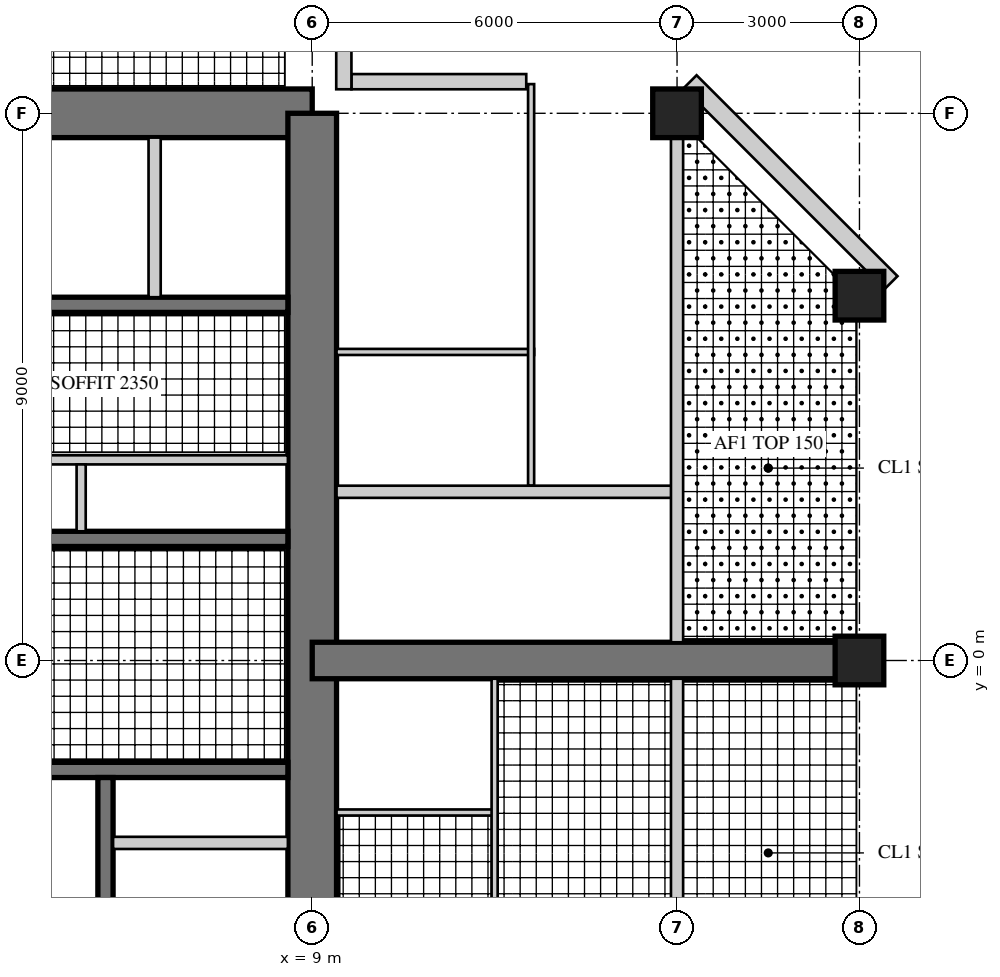
"""IFC4 building model, lengths in metres.
Left out: names, types, materials, properties, quantities, classifications, styles, units other than length and angle.
Written with IfcOpenShell. Run it as: python <this file> out.ifc"""

import sys

from ifc_helpers import new_model, si_unit, direction, frame, frame_2d, origin, origin_2d, place, context, subcontext, project, spatial, rectangle, hollow_rectangle, extrude, element, fill, save


model = new_model("IFC4")
c1 = context("Model", 3, precision=1e-05, world=origin(), true_north=direction((0.0, 1.0)))
c2 = subcontext(c1, "Body", "Model", "MODEL_VIEW")
j1 = project(units=[si_unit("LENGTHUNIT", "METRE"), si_unit("PLANEANGLEUNIT", "RADIAN")], contexts=[c1])
p1 = place(None, origin())
s1 = spatial("IfcSite", under=j1, at=p1, CompositionType="ELEMENT")
p2 = place(p1, origin())
s2 = spatial("IfcBuilding", under=s1, at=p2, CompositionType="ELEMENT")
p3 = place(p2, frame((0.0, 0.0, 235.7)))
s3 = spatial("IfcBuildingStorey", under=s2, at=p3, CompositionType="ELEMENT", Elevation=235.7)
p4 = place(p3, frame((9.0, 9.0, 0.0), z_axis=(0.0, 0.0, 1.0), x_axis=(-1.0, 0.0, 0.0)))
e1 = element("IfcWall", 1, at=p4, inside=s3, PredefinedType="SHEAR", context=c2, shape_type="SweptSolid", body=[
    extrude(rectangle(XDim=18.0, YDim=0.8, at=frame_2d((9.0, 0.0))), origin(), (0.0, 0.0, 1.0), 3.4),
])
p5 = place(p4, frame((9.8, 0.0, 0.0)))
e2 = element("IfcOpeningElement", 2, at=p5, cuts=e1, PredefinedType="OPENING", context=c2, shape_type="SweptSolid", body=[
    extrude(rectangle(XDim=1.0, YDim=2.4, at=frame_2d((0.5, 1.2))), frame((0.0, 0.41, 0.0), z_axis=(0.0, -1.0, 0.0), x_axis=(1.0, 0.0, 0.0)), (0.0, 0.0, 1.0), 0.82),
])
p6 = place(p3, frame((9.0, -9.0, 0.0), z_axis=(0.0, 0.0, 1.0), x_axis=(0.0, 1.0, 0.0)))
e3 = element("IfcWall", 3, at=p6, inside=s3, PredefinedType="SHEAR", context=c2, shape_type="SweptSolid", body=[
    extrude(rectangle(XDim=18.0, YDim=0.8, at=frame_2d((9.0, 0.0))), origin(), (0.0, 0.0, 1.0), 3.4),
])
p7 = place(p6, frame((9.8, 0.0, 0.0)))
e4 = element("IfcOpeningElement", 4, at=p7, cuts=e3, PredefinedType="OPENING", context=c2, shape_type="SweptSolid", body=[
    extrude(rectangle(XDim=1.0, YDim=2.4, at=frame_2d((0.5, 1.2))), frame((0.0, 0.41, 0.0), z_axis=(0.0, -1.0, 0.0), x_axis=(1.0, 0.0, 0.0)), (0.0, 0.0, 1.0), 0.82),
])
p8 = place(p3, frame((1.925, 2.0, 0.0), z_axis=(0.0, 0.0, 1.0), x_axis=(1.0, 0.0, 0.0)))
e5 = element("IfcWall", 5, at=p8, inside=s3, PredefinedType="SHEAR", context=c2, shape_type="SweptSolid", body=[
    extrude(rectangle(XDim=6.675, YDim=0.25, at=frame_2d((3.337, 0.0))), origin(), (0.0, 0.0, 1.0), 3.4),
])
p9 = place(p3, frame((1.925, 5.85, 0.0), z_axis=(0.0, 0.0, 1.0), x_axis=(1.0, 0.0, 0.0)))
e6 = element("IfcWall", 6, at=p9, inside=s3, PredefinedType="SHEAR", context=c2, shape_type="SweptSolid", body=[
    extrude(rectangle(XDim=6.675, YDim=0.25, at=frame_2d((3.337, 0.0))), origin(), (0.0, 0.0, 1.0), 3.4),
])
p10 = place(p9, frame((0.546, 0.0, 0.0)))
e7 = element("IfcOpeningElement", 7, at=p10, cuts=e6, PredefinedType="OPENING", context=c2, shape_type="SweptSolid", body=[
    extrude(rectangle(XDim=1.0, YDim=2.1, at=frame_2d((0.5, 1.05))), frame((0.0, 0.135, 0.0), z_axis=(0.0, -1.0, 0.0), x_axis=(1.0, 0.0, 0.0)), (0.0, 0.0, 1.0), 0.27),
])
p11 = place(p9, frame((5.129, 0.0, 0.0)))
e8 = element("IfcOpeningElement", 8, at=p11, cuts=e6, PredefinedType="OPENING", context=c2, shape_type="SweptSolid", body=[
    extrude(rectangle(XDim=1.0, YDim=2.1, at=frame_2d((0.5, 1.05))), frame((0.0, 0.135, 0.0), z_axis=(0.0, -1.0, 0.0), x_axis=(1.0, 0.0, 0.0)), (0.0, 0.0, 1.0), 0.27),
])
p12 = place(p3, frame((1.925, 3.3, 0.0), z_axis=(0.0, 0.0, 1.0), x_axis=(1.0, 0.0, 0.0)))
e9 = element("IfcWall", 9, at=p12, inside=s3, PredefinedType="PARTITIONING", context=c2, shape_type="SweptSolid", body=[
    extrude(rectangle(XDim=6.675, YDim=0.15, at=frame_2d((3.337, 0.0))), origin(), (0.0, 0.0, 1.0), 3.4),
])
p13 = place(p12, frame((0.075, 0.0, 0.0)))
e10 = element("IfcOpeningElement", 10, at=p13, cuts=e9, PredefinedType="OPENING", context=c2, shape_type="SweptSolid", body=[
    extrude(rectangle(XDim=0.8, YDim=2.1, at=frame_2d((0.4, 1.05))), frame((0.0, 0.085, 0.0), z_axis=(0.0, -1.0, 0.0), x_axis=(1.0, 0.0, 0.0)), (0.0, 0.0, 1.0), 0.17),
])
p14 = place(p12, frame((3.675, 0.0, 0.0)))
e11 = element("IfcOpeningElement", 11, at=p14, cuts=e9, PredefinedType="OPENING", context=c2, shape_type="SweptSolid", body=[
    extrude(rectangle(XDim=0.8, YDim=2.1, at=frame_2d((0.4, 1.05))), frame((0.0, 0.085, 0.0), z_axis=(0.0, -1.0, 0.0), x_axis=(1.0, 0.0, 0.0)), (0.0, 0.0, 1.0), 0.17),
])
p15 = place(p3, frame((5.2, 2.125, 0.0), z_axis=(0.0, 0.0, 1.0), x_axis=(0.0, 1.0, 0.0)))
e12 = element("IfcWall", 12, at=p15, inside=s3, PredefinedType="PARTITIONING", context=c2, shape_type="SweptSolid", body=[
    extrude(rectangle(XDim=1.1, YDim=0.15, at=frame_2d((0.55, 0.0))), origin(), (0.0, 0.0, 1.0), 3.4),
])
p16 = place(p3, frame((6.408, 5.975, 0.0), z_axis=(0.0, 0.0, 1.0), x_axis=(0.0, 1.0, 0.0)))
e13 = element("IfcWall", 13, at=p16, inside=s3, PredefinedType="PARTITIONING", context=c2, shape_type="SweptSolid", body=[
    extrude(rectangle(XDim=2.625, YDim=0.2, at=frame_2d((1.312, 0.0))), origin(), (0.0, 0.0, 1.0), 3.4),
])
p17 = place(p3, frame((2.125, -1.8, 0.0), z_axis=(0.0, 0.0, 1.0), x_axis=(1.0, 0.0, 0.0)))
e14 = element("IfcWall", 14, at=p17, inside=s3, PredefinedType="SHEAR", context=c2, shape_type="SweptSolid", body=[
    extrude(rectangle(XDim=6.475, YDim=0.25, at=frame_2d((3.238, 0.0))), origin(), (0.0, 0.0, 1.0), 3.4),
])
p18 = place(p3, frame((5.6, -1.925, 0.0), z_axis=(0.0, 0.0, 1.0), x_axis=(0.0, -1.0, 0.0)))
e15 = element("IfcWall", 15, at=p18, inside=s3, PredefinedType="SHEAR", context=c2, shape_type="SweptSolid", body=[
    extrude(rectangle(XDim=3.55, YDim=0.25, at=frame_2d((1.775, 0.0))), origin(), (0.0, 0.0, 1.0), 3.4),
])
p19 = place(p18, frame((1.525, 0.0, 0.0)))
e16 = element("IfcOpeningElement", 16, at=p19, cuts=e15, PredefinedType="OPENING", context=c2, shape_type="SweptSolid", body=[
    extrude(rectangle(XDim=1.1, YDim=2.2, at=frame_2d((0.55, 1.1))), frame((0.0, 0.135, 0.0), z_axis=(0.0, -1.0, 0.0), x_axis=(1.0, 0.0, 0.0)), (0.0, 0.0, 1.0), 0.27),
])
p20 = place(p18, frame((0.075, 0.0, 0.0)))
e17 = element("IfcOpeningElement", 17, at=p20, cuts=e15, PredefinedType="OPENING", context=c2, shape_type="SweptSolid", body=[
    extrude(rectangle(XDim=0.8, YDim=2.1, at=frame_2d((0.4, 1.05))), frame((0.0, 0.135, 0.0), z_axis=(0.0, -1.0, 0.0), x_axis=(1.0, 0.0, 0.0)), (0.0, 0.0, 1.0), 0.27),
])
p21 = place(p3, frame((5.725, -3.0, 0.0), z_axis=(0.0, 0.0, 1.0), x_axis=(1.0, 0.0, 0.0)))
e18 = element("IfcWall", 18, at=p21, inside=s3, PredefinedType="PARTITIONING", context=c2, shape_type="SweptSolid", body=[
    extrude(rectangle(XDim=2.875, YDim=0.2, at=frame_2d((1.438, 0.0))), origin(), (0.0, 0.0, 1.0), 3.4),
])
p22 = place(p3, frame((9.0, 0.0, 0.0), z_axis=(0.0, 0.0, 1.0), x_axis=(1.0, 0.0, 0.0)))
e19 = element("IfcWall", 19, at=p22, inside=s3, PredefinedType="SHEAR", context=c2, shape_type="SweptSolid", body=[
    extrude(rectangle(XDim=9.0, YDim=0.6, at=frame_2d((4.5, 0.0))), origin(), (0.0, 0.0, 1.0), 3.4),
])
p23 = place(p22, frame((3.8, 0.0, 0.0)))
e20 = element("IfcOpeningElement", 20, at=p23, cuts=e19, PredefinedType="OPENING", context=c2, shape_type="SweptSolid", body=[
    extrude(rectangle(XDim=1.0, YDim=2.15, at=frame_2d((0.5, 1.075))), frame((0.0, 0.31, 0.0), z_axis=(0.0, -1.0, 0.0), x_axis=(1.0, 0.0, 0.0)), (0.0, 0.0, 1.0), 0.62),
])
p24 = place(p22, frame((7.0, 0.0, 0.0)))
e21 = element("IfcOpeningElement", 21, at=p24, cuts=e19, PredefinedType="OPENING", context=c2, shape_type="SweptSolid", body=[
    extrude(rectangle(XDim=1.0, YDim=2.2, at=frame_2d((0.5, 1.1))), frame((0.0, 0.31, 0.0), z_axis=(0.0, -1.0, 0.0), x_axis=(1.0, 0.0, 0.0)), (0.0, 0.0, 1.0), 0.62),
])
for number, where, z_axis, x_axis in (
    (22, (15.0, 9.0, 0.0), (0.0, 0.0, 1.0), (1.0, 0.0, 0.0)),
    (23, (18.0, 0.0, 0.0), (0.0, 0.0, 1.0), (1.0, 0.0, 0.0)),
    (24, (18.0, 6.0, 0.0), (0.0, 0.0, 1.0), (1.0, 0.0, 0.0)),
):
    element("IfcColumn", number, at=place(p3, frame(where, z_axis=z_axis, x_axis=x_axis)), inside=s3, PredefinedType="COLUMN", context=c2, shape_type="SweptSolid", body=[
        extrude(rectangle(XDim=0.8, YDim=0.8, at=origin_2d()), origin(), (0.0, 0.0, 1.0), 3.4),
    ])
p25 = place(p3, frame((18.52, 6.215, 0.0), z_axis=(0.0, 0.0, 1.0), x_axis=(-0.707106781187, 0.707106781187, 0.0)))
e25 = element("IfcWall", 25, at=p25, inside=s3, PredefinedType="SOLIDWALL", context=c2, shape_type="SweptSolid", body=[
    extrude(rectangle(XDim=4.674, YDim=0.3, at=frame_2d((2.337, 0.0))), origin(), (0.0, 0.0, 1.0), 3.22),
])
p26 = place(p25, frame((1.887, 0.0, 0.3)))
e26 = element("IfcOpeningElement", 26, at=p26, cuts=e25, PredefinedType="OPENING", context=c2, shape_type="SweptSolid", body=[
    extrude(rectangle(XDim=0.9, YDim=2.4, at=frame_2d((0.45, 1.2))), frame((0.0, 0.16, 0.0), z_axis=(0.0, -1.0, 0.0), x_axis=(1.0, 0.0, 0.0)), (0.0, 0.0, 1.0), 0.32),
])
p27 = place(p3, frame((12.52, 9.52, 0.0), z_axis=(0.0, 0.0, 1.0), x_axis=(-1.0, 0.0, 0.0)))
e27 = element("IfcWall", 27, at=p27, inside=s3, PredefinedType="SOLIDWALL", context=c2, shape_type="SweptSolid", body=[
    extrude(rectangle(XDim=2.875, YDim=0.25, at=frame_2d((1.438, 0.0))), origin(), (0.0, 0.0, 1.0), 3.22),
])
p28 = place(p27, frame((0.6, 0.0, 0.0)))
e28 = element("IfcOpeningElement", 28, at=p28, cuts=e27, PredefinedType="OPENING", context=c2, shape_type="SweptSolid", body=[
    extrude(rectangle(XDim=1.0, YDim=2.2, at=frame_2d((0.5, 1.1))), frame((0.0, 0.135, 0.0), z_axis=(0.0, -1.0, 0.0), x_axis=(1.0, 0.0, 0.0)), (0.0, 0.0, 1.0), 0.27),
])
p29 = place(p3, frame((9.52, 9.395, 0.0), z_axis=(0.0, 0.0, 1.0), x_axis=(0.0, 1.0, 0.0)))
e29 = element("IfcWall", 29, at=p29, inside=s3, PredefinedType="SOLIDWALL", context=c2, shape_type="SweptSolid", body=[
    extrude(rectangle(XDim=3.125, YDim=0.25, at=frame_2d((1.562, 0.0))), origin(), (0.0, 0.0, 1.0), 3.22),
])
p30 = place(p29, frame((0.6, 0.0, 0.0)))
e30 = element("IfcOpeningElement", 30, at=p30, cuts=e29, PredefinedType="OPENING", context=c2, shape_type="SweptSolid", body=[
    extrude(rectangle(XDim=1.0, YDim=2.2, at=frame_2d((0.5, 1.1))), frame((0.0, 0.135, 0.0), z_axis=(0.0, -1.0, 0.0), x_axis=(1.0, 0.0, 0.0)), (0.0, 0.0, 1.0), 0.27),
])
p31 = place(p3, frame((9.4, 5.075, 0.0), z_axis=(0.0, 0.0, 1.0), x_axis=(1.0, 0.0, 0.0)))
e31 = element("IfcWall", 31, at=p31, inside=s3, PredefinedType="PARTITIONING", context=c2, shape_type="SweptSolid", body=[
    extrude(rectangle(XDim=3.25, YDim=0.1, at=frame_2d((1.625, 0.0))), origin(), (0.0, 0.0, 1.0), 3.22),
])
p32 = place(p3, frame((12.6, 2.875, 0.0), z_axis=(0.0, 0.0, 1.0), x_axis=(0.0, 1.0, 0.0)))
e32 = element("IfcWall", 32, at=p32, inside=s3, PredefinedType="PARTITIONING", context=c2, shape_type="SweptSolid", body=[
    extrude(rectangle(XDim=6.605, YDim=0.1, at=frame_2d((3.302, 0.0))), origin(), (0.0, 0.0, 1.0), 3.22),
])
p33 = place(p32, frame((0.55, 0.0, 0.0)))
e33 = element("IfcOpeningElement", 33, at=p33, cuts=e32, PredefinedType="OPENING", context=c2, shape_type="SweptSolid", body=[
    extrude(rectangle(XDim=0.9, YDim=2.1, at=frame_2d((0.45, 1.05))), frame((0.0, 0.06, 0.0), z_axis=(0.0, -1.0, 0.0), x_axis=(1.0, 0.0, 0.0)), (0.0, 0.0, 1.0), 0.12),
])
p34 = place(p32, frame((2.65, 0.0, 0.0)))
e34 = element("IfcOpeningElement", 34, at=p34, cuts=e32, PredefinedType="OPENING", context=c2, shape_type="SweptSolid", body=[
    extrude(rectangle(XDim=0.9, YDim=2.1, at=frame_2d((0.45, 1.05))), frame((0.0, 0.06, 0.0), z_axis=(0.0, -1.0, 0.0), x_axis=(1.0, 0.0, 0.0)), (0.0, 0.0, 1.0), 0.12),
])
p35 = place(p3, frame((9.4, -2.5, 0.0), z_axis=(0.0, 0.0, 1.0), x_axis=(1.0, 0.0, 0.0)))
e35 = element("IfcWall", 35, at=p35, inside=s3, PredefinedType="PARTITIONING", context=c2, shape_type="SweptSolid", body=[
    extrude(rectangle(XDim=2.65, YDim=0.1, at=frame_2d((1.325, 0.0))), origin(), (0.0, 0.0, 1.0), 3.22),
])
p36 = place(p3, frame((12.0, -9.395, 0.0), z_axis=(0.0, 0.0, 1.0), x_axis=(0.0, 1.0, 0.0)))
e36 = element("IfcWall", 36, at=p36, inside=s3, PredefinedType="PARTITIONING", context=c2, shape_type="SweptSolid", body=[
    extrude(rectangle(XDim=9.095, YDim=0.1, at=frame_2d((4.547, 0.0))), origin(), (0.0, 0.0, 1.0), 3.22),
])
p37 = place(p36, frame((5.545, 0.0, 0.0)))
e37 = element("IfcOpeningElement", 37, at=p37, cuts=e36, PredefinedType="OPENING", context=c2, shape_type="SweptSolid", body=[
    extrude(rectangle(XDim=0.9, YDim=2.1, at=frame_2d((0.45, 1.05))), frame((0.0, 0.06, 0.0), z_axis=(0.0, -1.0, 0.0), x_axis=(1.0, 0.0, 0.0)), (0.0, 0.0, 1.0), 0.12),
])
p38 = place(p36, frame((7.645, 0.0, 0.0)))
e38 = element("IfcOpeningElement", 38, at=p38, cuts=e36, PredefinedType="OPENING", context=c2, shape_type="SweptSolid", body=[
    extrude(rectangle(XDim=0.9, YDim=2.1, at=frame_2d((0.45, 1.05))), frame((0.0, 0.06, 0.0), z_axis=(0.0, -1.0, 0.0), x_axis=(1.0, 0.0, 0.0)), (0.0, 0.0, 1.0), 0.12),
])
p39 = place(p3, frame((9.4, 2.775, 0.0), z_axis=(0.0, 0.0, 1.0), x_axis=(1.0, 0.0, 0.0)))
e39 = element("IfcWall", 39, at=p39, inside=s3, PredefinedType="SOLIDWALL", context=c2, shape_type="SweptSolid", body=[
    extrude(rectangle(XDim=5.6, YDim=0.2, at=frame_2d((2.8, 0.0))), origin(), (0.0, 0.0, 1.0), 3.22),
])
p40 = place(p39, frame((3.75, 0.0, 0.0)))
e40 = element("IfcOpeningElement", 40, at=p40, cuts=e39, PredefinedType="OPENING", context=c2, shape_type="SweptSolid", body=[
    extrude(rectangle(XDim=1.0, YDim=2.15, at=frame_2d((0.5, 1.075))), frame((0.0, 0.11, 0.0), z_axis=(0.0, -1.0, 0.0), x_axis=(1.0, 0.0, 0.0)), (0.0, 0.0, 1.0), 0.22),
])
p41 = place(p3, frame((15.0, -8.6, 0.0), z_axis=(0.0, 0.0, 1.0), x_axis=(0.0, 1.0, 0.0)))
e41 = element("IfcWall", 41, at=p41, inside=s3, PredefinedType="SOLIDWALL", context=c2, shape_type="SweptSolid", body=[
    extrude(rectangle(XDim=8.3, YDim=0.2, at=frame_2d((4.15, 0.0))), origin(), (0.0, 0.0, 1.0), 2.52),
])
p42 = place(p3, frame((15.0, 0.3, 0.0), z_axis=(0.0, 0.0, 1.0), x_axis=(0.0, 1.0, 0.0)))
e42 = element("IfcWall", 42, at=p42, inside=s3, PredefinedType="SOLIDWALL", context=c2, shape_type="SweptSolid", body=[
    extrude(rectangle(XDim=8.3, YDim=0.2, at=frame_2d((4.15, 0.0))), origin(), (0.0, 0.0, 1.0), 2.52),
])
p43 = place(p42, frame((0.45, 0.0, 0.0)))
e43 = element("IfcOpeningElement", 43, at=p43, cuts=e42, PredefinedType="OPENING", context=c2, shape_type="SweptSolid", body=[
    extrude(rectangle(XDim=1.0, YDim=2.2, at=frame_2d((0.5, 1.1))), frame((0.0, 0.11, 0.0), z_axis=(0.0, -1.0, 0.0), x_axis=(1.0, 0.0, 0.0)), (0.0, 0.0, 1.0), 0.22),
])
p44 = place(p26, origin())
e44 = element("IfcWindow", 44, at=p44, inside=s3, PartitioningType="SINGLE_PANEL", PredefinedType="WINDOW", context=c2, shape_type="SweptSolid", body=[
    extrude(hollow_rectangle(XDim=0.9, YDim=2.4, WallThickness=0.06, at=frame_2d((0.45, 1.2))), frame((0.0, 0.03, 0.0), z_axis=(0.0, -1.0, 0.0), x_axis=(1.0, 0.0, 0.0)), (0.0, 0.0, 1.0), 0.06),
    extrude(rectangle(XDim=0.779, YDim=2.279, at=frame_2d((0.45, 1.2))), frame((0.0, 0.03, 0.0), z_axis=(0.0, -1.0, 0.0), x_axis=(1.0, 0.0, 0.0)), (0.0, 0.0, 1.0), 0.06),
])
fill(e26, e44)
p45 = place(p28, origin())
e45 = element("IfcDoor", 45, at=p45, inside=s3, OperationType="SINGLE_SWING_LEFT", PredefinedType="DOOR", context=c2, shape_type="SweptSolid", body=[
    extrude(hollow_rectangle(XDim=1.0, YDim=2.2, WallThickness=0.06, at=frame_2d((0.5, 1.1))), frame((0.0, 0.025, 0.0), z_axis=(0.0, -1.0, 0.0), x_axis=(1.0, 0.0, 0.0)), (0.0, 0.0, 1.0), 0.05),
    extrude(rectangle(XDim=0.879, YDim=2.079, at=frame_2d((0.5, 1.1))), frame((0.0, 0.025, 0.0), z_axis=(0.0, -1.0, 0.0), x_axis=(1.0, 0.0, 0.0)), (0.0, 0.0, 1.0), 0.05),
])
fill(e28, e45)
p46 = place(p30, origin())
e46 = element("IfcDoor", 46, at=p46, inside=s3, OperationType="SINGLE_SWING_RIGHT", PredefinedType="DOOR", context=c2, shape_type="SweptSolid", body=[
    extrude(hollow_rectangle(XDim=1.0, YDim=2.2, WallThickness=0.06, at=frame_2d((0.5, 1.1))), frame((0.0, 0.025, 0.0), z_axis=(0.0, -1.0, 0.0), x_axis=(1.0, 0.0, 0.0)), (0.0, 0.0, 1.0), 0.05),
    extrude(rectangle(XDim=0.879, YDim=2.079, at=frame_2d((0.5, 1.1))), frame((0.0, 0.025, 0.0), z_axis=(0.0, -1.0, 0.0), x_axis=(1.0, 0.0, 0.0)), (0.0, 0.0, 1.0), 0.05),
])
fill(e30, e46)
p47 = place(p33, origin())
e47 = element("IfcDoor", 47, at=p47, inside=s3, OperationType="SINGLE_SWING_LEFT", PredefinedType="DOOR", context=c2, shape_type="SweptSolid", body=[
    extrude(rectangle(XDim=0.9, YDim=2.1, at=frame_2d((0.45, 1.05))), frame((0.0, 0.025, 0.0), z_axis=(0.0, -1.0, 0.0), x_axis=(1.0, 0.0, 0.0)), (0.0, 0.0, 1.0), 0.05),
])
fill(e33, e47)
p48 = place(p34, origin())
e48 = element("IfcDoor", 48, at=p48, inside=s3, OperationType="SINGLE_SWING_LEFT", PredefinedType="DOOR", context=c2, shape_type="SweptSolid", body=[
    extrude(rectangle(XDim=0.9, YDim=2.1, at=frame_2d((0.45, 1.05))), frame((0.0, 0.025, 0.0), z_axis=(0.0, -1.0, 0.0), x_axis=(1.0, 0.0, 0.0)), (0.0, 0.0, 1.0), 0.05),
])
fill(e34, e48)
p49 = place(p37, origin())
e49 = element("IfcDoor", 49, at=p49, inside=s3, OperationType="SINGLE_SWING_RIGHT", PredefinedType="DOOR", context=c2, shape_type="SweptSolid", body=[
    extrude(rectangle(XDim=0.9, YDim=2.1, at=frame_2d((0.45, 1.05))), frame((0.0, 0.025, 0.0), z_axis=(0.0, -1.0, 0.0), x_axis=(1.0, 0.0, 0.0)), (0.0, 0.0, 1.0), 0.05),
])
fill(e37, e49)
p50 = place(p38, origin())
e50 = element("IfcDoor", 50, at=p50, inside=s3, OperationType="SINGLE_SWING_RIGHT", PredefinedType="DOOR", context=c2, shape_type="SweptSolid", body=[
    extrude(rectangle(XDim=0.9, YDim=2.1, at=frame_2d((0.45, 1.05))), frame((0.0, 0.025, 0.0), z_axis=(0.0, -1.0, 0.0), x_axis=(1.0, 0.0, 0.0)), (0.0, 0.0, 1.0), 0.05),
])
fill(e38, e50)
p51 = place(p40, origin())
e51 = element("IfcDoor", 51, at=p51, inside=s3, OperationType="SINGLE_SWING_LEFT", PredefinedType="DOOR", context=c2, shape_type="SweptSolid", body=[
    extrude(rectangle(XDim=1.0, YDim=2.15, at=frame_2d((0.5, 1.075))), frame((0.0, 0.025, 0.0), z_axis=(0.0, -1.0, 0.0), x_axis=(1.0, 0.0, 0.0)), (0.0, 0.0, 1.0), 0.05),
])
fill(e40, e51)
p52 = place(p43, frame((1.0, 0.0, 0.0), z_axis=(0.0, 0.0, 1.0), x_axis=(-1.0, 0.0, 0.0)))
e52 = element("IfcDoor", 52, at=p52, inside=s3, OperationType="SINGLE_SWING_LEFT", PredefinedType="DOOR", context=c2, shape_type="SweptSolid", body=[
    extrude(rectangle(XDim=1.0, YDim=2.2, at=frame_2d((0.5, 1.1))), frame((0.0, 0.025, 0.0), z_axis=(0.0, -1.0, 0.0), x_axis=(1.0, 0.0, 0.0)), (0.0, 0.0, 1.0), 0.05),
])
fill(e43, e52)
p53 = place(p23, frame((1.0, 0.0, 0.0), z_axis=(0.0, 0.0, 1.0), x_axis=(-1.0, 0.0, 0.0)))
e53 = element("IfcDoor", 53, at=p53, inside=s3, OperationType="SINGLE_SWING_RIGHT", PredefinedType="DOOR", context=c2, shape_type="SweptSolid", body=[
    extrude(rectangle(XDim=1.0, YDim=2.15, at=frame_2d((0.5, 1.075))), frame((0.0, 0.025, 0.0), z_axis=(0.0, -1.0, 0.0), x_axis=(1.0, 0.0, 0.0)), (0.0, 0.0, 1.0), 0.05),
])
fill(e20, e53)
p54 = place(p24, origin())
e54 = element("IfcDoor", 54, at=p54, inside=s3, OperationType="SINGLE_SWING_LEFT", PredefinedType="DOOR", context=c2, shape_type="SweptSolid", body=[
    extrude(rectangle(XDim=1.0, YDim=2.2, at=frame_2d((0.5, 1.1))), frame((0.0, 0.025, 0.0), z_axis=(0.0, -1.0, 0.0), x_axis=(1.0, 0.0, 0.0)), (0.0, 0.0, 1.0), 0.05),
])
fill(e21, e54)
p55 = place(p7, origin())
e55 = element("IfcDoor", 55, at=p55, inside=s3, OperationType="SINGLE_SWING_RIGHT", PredefinedType="DOOR", context=c2, shape_type="SweptSolid", body=[
    extrude(rectangle(XDim=1.0, YDim=2.4, at=frame_2d((0.5, 1.2))), frame((0.0, 0.055, 0.0), z_axis=(0.0, -1.0, 0.0), x_axis=(1.0, 0.0, 0.0)), (0.0, 0.0, 1.0), 0.05),
])
fill(e4, e55)
p56 = place(p14, frame((0.8, 0.0, 0.0), z_axis=(0.0, 0.0, 1.0), x_axis=(-1.0, 0.0, 0.0)))
e56 = element("IfcDoor", 56, at=p56, inside=s3, OperationType="SINGLE_SWING_RIGHT", PredefinedType="DOOR", context=c2, shape_type="SweptSolid", body=[
    extrude(rectangle(XDim=0.8, YDim=2.1, at=frame_2d((0.4, 1.05))), frame((0.0, 0.025, 0.0), z_axis=(0.0, -1.0, 0.0), x_axis=(1.0, 0.0, 0.0)), (0.0, 0.0, 1.0), 0.05),
])
fill(e11, e56)
p57 = place(p19, origin())
e57 = element("IfcDoor", 57, at=p57, inside=s3, OperationType="DOUBLE_DOOR_SLIDING", PredefinedType="DOOR", context=c2, shape_type="SweptSolid", body=[
    extrude(rectangle(XDim=1.1, YDim=2.2, at=frame_2d((0.55, 1.1))), frame((0.0, 0.025, 0.0), z_axis=(0.0, -1.0, 0.0), x_axis=(1.0, 0.0, 0.0)), (0.0, 0.0, 1.0), 0.05),
])
fill(e16, e57)
p58 = place(p20, origin())
e58 = element("IfcDoor", 58, at=p58, inside=s3, OperationType="SINGLE_SWING_LEFT", PredefinedType="DOOR", context=c2, shape_type="SweptSolid", body=[
    extrude(rectangle(XDim=0.8, YDim=2.1, at=frame_2d((0.4, 1.05))), frame((0.0, 0.025, 0.0), z_axis=(0.0, -1.0, 0.0), x_axis=(1.0, 0.0, 0.0)), (0.0, 0.0, 1.0), 0.05),
])
fill(e17, e58)
p59 = place(p11, origin())
e59 = element("IfcDoor", 59, at=p59, inside=s3, OperationType="SINGLE_SWING_RIGHT", PredefinedType="DOOR", context=c2, shape_type="SweptSolid", body=[
    extrude(rectangle(XDim=1.0, YDim=2.1, at=frame_2d((0.5, 1.05))), frame((0.0, 0.025, 0.0), z_axis=(0.0, -1.0, 0.0), x_axis=(1.0, 0.0, 0.0)), (0.0, 0.0, 1.0), 0.05),
])
fill(e8, e59)
save(model, sys.argv[1])
